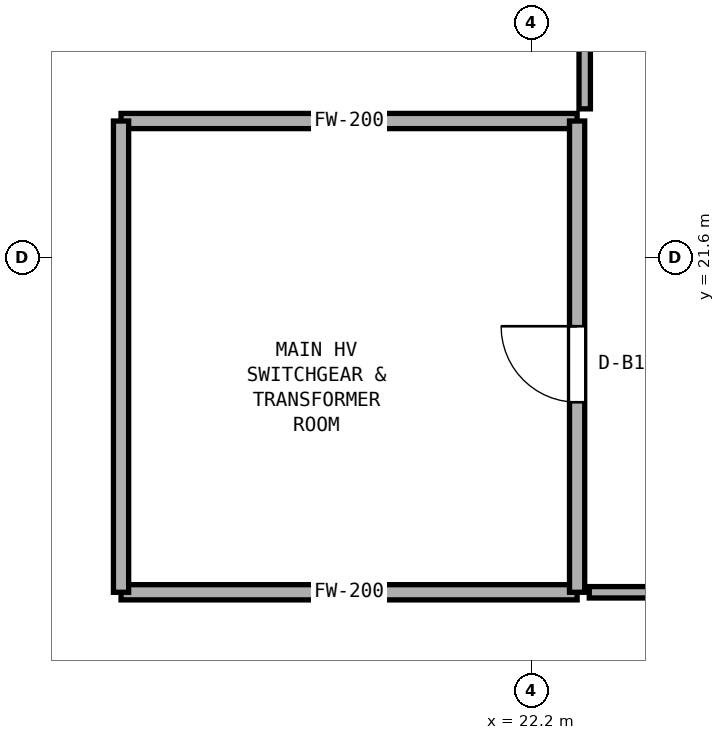
"""IFC4 building model, lengths in metres.
Left out: names, types, materials, properties, quantities, classifications, styles, units other than length and angle.
Written with IfcOpenShell. Run it as: python <this file> out.ifc"""

import sys

from ifc_helpers import new_model, si_unit, direction, frame, frame_2d, origin, place, context, subcontext, project, spatial, rectangle, extrude, element, fill, save


model = new_model("IFC4")
c1 = context("Model", 3, precision=1e-05, world=origin(), true_north=direction((0.0, 1.0)))
c2 = subcontext(c1, "Body", "Model", "MODEL_VIEW")
j1 = project(units=[si_unit("LENGTHUNIT", "METRE"), si_unit("PLANEANGLEUNIT", "RADIAN")], contexts=[c1])
p1 = place(None, origin())
s1 = spatial("IfcSite", under=j1, at=p1, CompositionType="ELEMENT")
p2 = place(p1, origin())
s2 = spatial("IfcBuilding", under=s1, at=p2, CompositionType="ELEMENT")
p3 = place(p2, frame((0.0, 0.0, -4.8)))
s3 = spatial("IfcBuildingStorey", under=s2, at=p3, CompositionType="ELEMENT", Elevation=-4.8)
for number, where, z_axis, x_axis in (
    (1, (16.8, 17.2, 0.0), (0.0, 0.0, 1.0), (1.0, 0.0, 0.0)),
    (2, (16.8, 23.4, 0.0), (0.0, 0.0, 1.0), (1.0, 0.0, 0.0)),
):
    element("IfcWall", number, at=place(p3, frame(where, z_axis=z_axis, x_axis=x_axis)), inside=s3, PredefinedType="SOLIDWALL", context=c2, shape_type="SweptSolid", body=[
        extrude(rectangle(XDim=6.0, YDim=0.2, at=frame_2d((3.0, 0.0))), origin(), (0.0, 0.0, 1.0), 4.45),
    ])
p4 = place(p3, frame((16.8, 17.2, 0.0), z_axis=(0.0, 0.0, 1.0), x_axis=(0.0, 1.0, 0.0)))
e3 = element("IfcWall", 3, at=p4, inside=s3, PredefinedType="SOLIDWALL", context=c2, shape_type="SweptSolid", body=[
    extrude(rectangle(XDim=6.2, YDim=0.2, at=frame_2d((3.1, 0.0))), origin(), (0.0, 0.0, 1.0), 4.45),
])
p5 = place(p3, frame((22.8, 17.2, 0.0), z_axis=(0.0, 0.0, 1.0), x_axis=(0.0, 1.0, 0.0)))
e4 = element("IfcWall", 4, at=p5, inside=s3, PredefinedType="SOLIDWALL", context=c2, shape_type="SweptSolid", body=[
    extrude(rectangle(XDim=6.2, YDim=0.2, at=frame_2d((3.1, 0.0))), origin(), (0.0, 0.0, 1.0), 4.45),
])
p6 = place(p5, frame((2.5, 0.0, 0.0)))
e5 = element("IfcOpeningElement", 5, at=p6, cuts=e4, PredefinedType="OPENING", context=c2, shape_type="SweptSolid", body=[
    extrude(rectangle(XDim=1.0, YDim=2.12, at=frame_2d((0.5, 1.06))), frame((0.0, 0.11, 0.0), z_axis=(0.0, -1.0, 0.0), x_axis=(1.0, 0.0, 0.0)), (0.0, 0.0, 1.0), 0.22),
])
p7 = place(p3, frame((22.9, 23.56, 0.0), z_axis=(0.0, 0.0, 1.0), x_axis=(0.0, 1.0, 0.0)))
e6 = element("IfcWall", 6, at=p7, inside=s3, PredefinedType="PARTITIONING", context=c2, shape_type="SweptSolid", body=[
    extrude(rectangle(XDim=3.28, YDim=0.15, at=frame_2d((1.64, 0.0))), origin(), (0.0, 0.0, 1.0), 4.45),
])
p8 = place(p3, frame((22.96, 17.2, 0.0), z_axis=(0.0, 0.0, 1.0), x_axis=(1.0, 0.0, 0.0)))
e7 = element("IfcWall", 7, at=p8, inside=s3, PredefinedType="PARTITIONING", context=c2, shape_type="SweptSolid", body=[
    extrude(rectangle(XDim=2.3, YDim=0.15, at=frame_2d((1.15, 0.0))), origin(), (0.0, 0.0, 1.0), 4.45),
])
p9 = place(p6, origin())
e8 = element("IfcDoor", 8, at=p9, inside=s3, OperationType="SINGLE_SWING_RIGHT", PredefinedType="DOOR", context=c2, shape_type="SweptSolid", body=[
    extrude(rectangle(XDim=1.0, YDim=2.12, at=frame_2d((0.5, 1.06))), frame((0.0, 0.025, 0.0), z_axis=(0.0, -1.0, 0.0), x_axis=(1.0, 0.0, 0.0)), (0.0, 0.0, 1.0), 0.05),
])
fill(e5, e8)
save(model, sys.argv[1])
